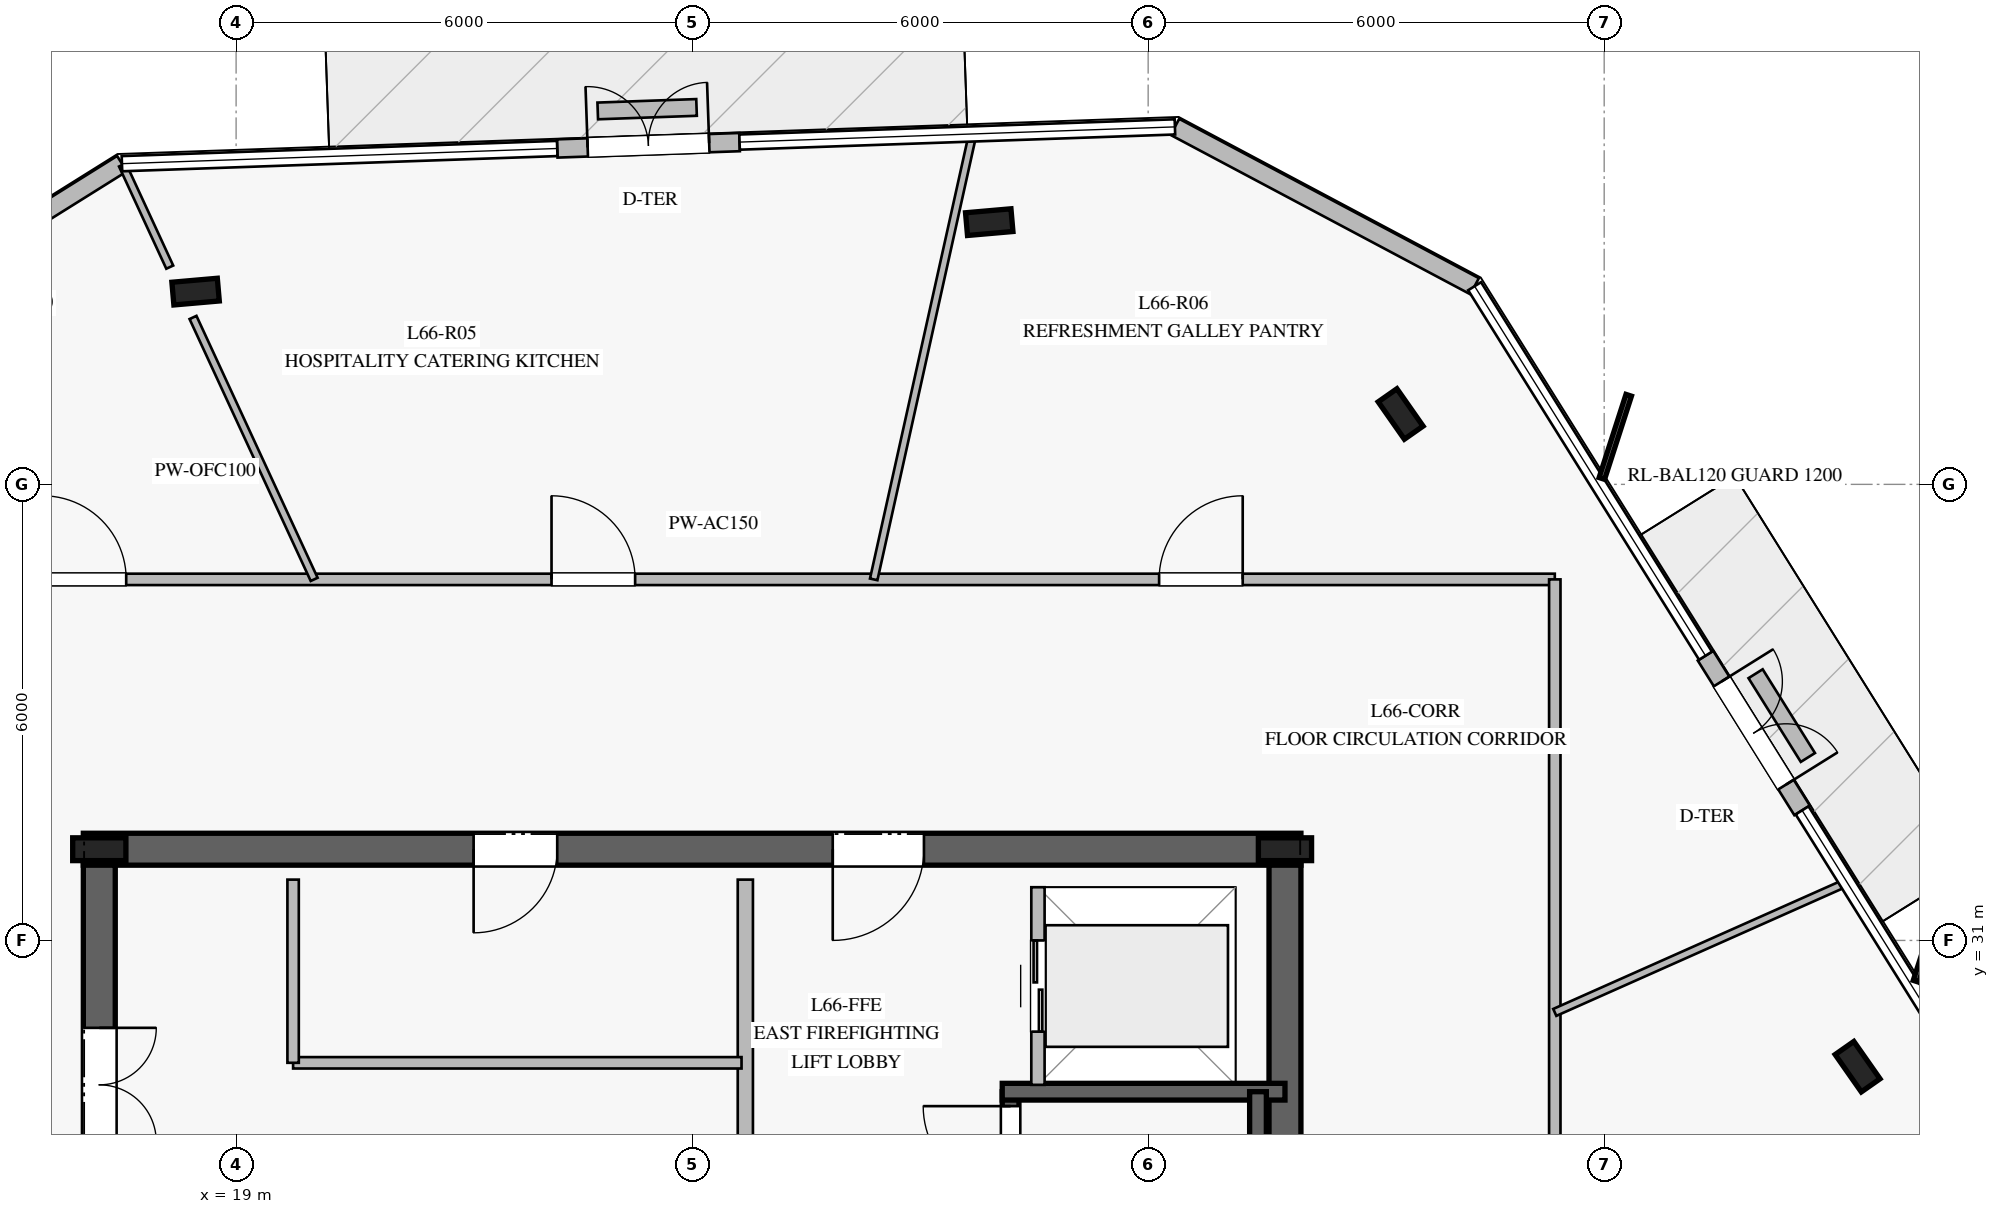
"""IFC4 building model, lengths in metres.
Left out: names, types, materials, properties, quantities, classifications, styles, units other than length and angle.
Written with IfcOpenShell. Run it as: python <this file> out.ifc"""

import sys

from ifc_helpers import new_model, si_unit, direction, frame, frame_2d, origin, origin_2d, place, context, subcontext, project, spatial, rectangle, i_section, extrude, element, fill, save


model = new_model("IFC4")
c1 = context("Model", 3, precision=1e-05, world=origin(), true_north=direction((0.0, 1.0)))
c2 = subcontext(c1, "Body", "Model", "MODEL_VIEW")
j1 = project(units=[si_unit("LENGTHUNIT", "METRE"), si_unit("PLANEANGLEUNIT", "RADIAN")], contexts=[c1])
p1 = place(None, origin())
s1 = spatial("IfcSite", under=j1, at=p1, CompositionType="ELEMENT")
p2 = place(p1, origin())
s2 = spatial("IfcBuilding", under=s1, at=p2, CompositionType="ELEMENT")
p3 = place(p2, frame((0.0, 0.0, 274.2)))
s3 = spatial("IfcBuildingStorey", under=s2, at=p3, CompositionType="ELEMENT", Elevation=274.2)
p4 = place(p3, frame((33.01, 32.2, 0.0), z_axis=(0.0, 0.0, 1.0), x_axis=(-1.0, 0.0, 0.0)))
e1 = element("IfcWall", 1, at=p4, inside=s3, PredefinedType="SHEAR", context=c2, shape_type="SweptSolid", body=[
    extrude(rectangle(XDim=16.02, YDim=0.42, at=frame_2d((8.01, 0.0))), origin(), (0.0, 0.0, 1.0), 3.78),
])
p5 = place(p4, frame((4.96, 0.0, 0.0)))
e2 = element("IfcOpeningElement", 2, at=p5, cuts=e1, PredefinedType="OPENING", context=c2, shape_type="SweptSolid", body=[
    extrude(rectangle(XDim=1.2, YDim=2.25, at=frame_2d((0.6, 1.125))), frame((0.0, 0.22, 0.0), z_axis=(0.0, -1.0, 0.0), x_axis=(1.0, 0.0, 0.0)), (0.0, 0.0, 1.0), 0.44),
])
p6 = place(p4, frame((9.785, 0.0, 0.0)))
e3 = element("IfcOpeningElement", 3, at=p6, cuts=e1, PredefinedType="OPENING", context=c2, shape_type="SweptSolid", body=[
    extrude(rectangle(XDim=1.1, YDim=2.2, at=frame_2d((0.55, 1.1))), frame((0.0, 0.22, 0.0), z_axis=(0.0, -1.0, 0.0), x_axis=(1.0, 0.0, 0.0)), (0.0, 0.0, 1.0), 0.44),
])
p7 = place(p3, frame((17.2, 31.99, 0.0), z_axis=(0.0, 0.0, 1.0), x_axis=(0.0, -1.0, 0.0)))
e4 = element("IfcWall", 4, at=p7, inside=s3, PredefinedType="SHEAR", context=c2, shape_type="SweptSolid", body=[
    extrude(rectangle(XDim=13.98, YDim=0.42, at=frame_2d((6.99, 0.0))), origin(), (0.0, 0.0, 1.0), 3.78),
])
p8 = place(p7, frame((2.14, 0.0, 0.0)))
e5 = element("IfcOpeningElement", 5, at=p8, cuts=e4, PredefinedType="OPENING", context=c2, shape_type="SweptSolid", body=[
    extrude(rectangle(XDim=1.5, YDim=2.2, at=frame_2d((0.75, 1.1))), frame((0.0, 0.22, 0.0), z_axis=(0.0, -1.0, 0.0), x_axis=(1.0, 0.0, 0.0)), (0.0, 0.0, 1.0), 0.44),
])
p9 = place(p3, frame((32.8, 18.01, 0.0), z_axis=(0.0, 0.0, 1.0), x_axis=(0.0, 1.0, 0.0)))
e6 = element("IfcWall", 6, at=p9, inside=s3, PredefinedType="SHEAR", context=c2, shape_type="SweptSolid", body=[
    extrude(rectangle(XDim=13.98, YDim=0.42, at=frame_2d((6.99, 0.0))), origin(), (0.0, 0.0, 1.0), 3.78),
])
for number, where, z_axis, x_axis in (
    (7, (32.8, 32.2, 0.0), (0.0, 0.0, 1.0), (1.0, 0.0, 0.0)),
    (8, (17.2, 32.2, 0.0), (0.0, 0.0, 1.0), (1.0, 0.0, 0.0)),
):
    element("IfcColumn", number, at=place(p3, frame(where, z_axis=z_axis, x_axis=x_axis)), inside=s3, PredefinedType="COLUMN", context=c2, shape_type="SweptSolid", body=[
        extrude(i_section(OverallWidth=0.3, OverallDepth=0.7, WebThickness=0.017, FlangeThickness=0.032, at=origin_2d()), origin(), (0.0, 0.0, 1.0), 4.0),
    ])
p10 = place(p3, frame((29.19, 21.79, 0.0), z_axis=(0.0, 0.0, 1.0), x_axis=(0.0, 1.0, 0.0)))
e9 = element("IfcWall", 9, at=p10, inside=s3, PredefinedType="SOLIDWALL", context=c2, shape_type="SweptSolid", body=[
    extrude(rectangle(XDim=7.22, YDim=0.22, at=frame_2d((3.61, 0.0))), origin(), (0.0, 0.0, 1.0), 3.78),
])
p11 = place(p10, frame((5.88, 0.0, 0.0)))
e10 = element("IfcOpeningElement", 10, at=p11, cuts=e9, PredefinedType="OPENING", context=c2, shape_type="SweptSolid", body=[
    extrude(rectangle(XDim=1.15, YDim=2.2, at=frame_2d((0.575, 1.1))), frame((0.0, 0.12, 0.0), z_axis=(0.0, -1.0, 0.0), x_axis=(1.0, 0.0, 0.0)), (0.0, 0.0, 1.0), 0.24),
])
p12 = place(p3, frame((29.08, 29.01, 0.0), z_axis=(0.0, 0.0, 1.0), x_axis=(1.0, 0.0, 0.0)))
e11 = element("IfcWall", 11, at=p12, inside=s3, PredefinedType="SOLIDWALL", context=c2, shape_type="SweptSolid", body=[
    extrude(rectangle(XDim=3.72, YDim=0.22, at=frame_2d((1.86, 0.0))), origin(), (0.0, 0.0, 1.0), 3.78),
])
p13 = place(p3, frame((32.445, 29.01, 0.0), z_axis=(0.0, 0.0, 1.0), x_axis=(0.0, -1.0, 0.0)))
e12 = element("IfcWall", 12, at=p13, inside=s3, PredefinedType="SOLIDWALL", context=c2, shape_type="SweptSolid", body=[
    extrude(rectangle(XDim=7.22, YDim=0.22, at=frame_2d((3.61, 0.0))), origin(), (0.0, 0.0, 1.0), 3.78),
])
for number, where, z_axis, x_axis in (
    (13, (28.909, 40.45, 0.0), (0.0, 0.0, 1.0), (0.996, 0.087, 0.0)),
    (14, (18.467, 39.536, 0.0), (0.0, 0.0, 1.0), (0.996, 0.087, 0.0)),
    (15, (40.334, 29.339, 0.0), (0.0, 0.0, 1.0), (-0.574, 0.819, 0.0)),
    (16, (34.322, 37.926, 0.0), (0.0, 0.0, 1.0), (-0.574, 0.819, 0.0)),
):
    element("IfcColumn", number, at=place(p3, frame(where, z_axis=z_axis, x_axis=x_axis)), inside=s3, PredefinedType="COLUMN", context=c2, shape_type="SweptSolid", body=[
        extrude(i_section(OverallWidth=0.3, OverallDepth=0.6, WebThickness=0.015, FlangeThickness=0.03, at=origin_2d()), origin(), (0.0, 0.0, 1.0), 4.0),
    ])
p14 = place(p3, frame((25.624, 41.503, 0.0), z_axis=(0.0, 0.0, 1.0), x_axis=(-0.999387742129, -0.03498772474, 0.0)))
e17 = element("IfcWall", 17, at=p14, inside=s3, PredefinedType="STANDARD", context=c2, shape_type="SweptSolid", body=[
    extrude(rectangle(XDim=2.4, YDim=0.24, at=frame_2d((1.2, 0.0))), origin(), (0.0, 0.0, 1.0), 3.78),
])
p15 = place(p14, frame((0.4, 0.0, 0.0)))
e18 = element("IfcOpeningElement", 18, at=p15, cuts=e17, PredefinedType="OPENING", context=c2, shape_type="SweptSolid", body=[
    extrude(rectangle(XDim=1.6, YDim=2.25, at=frame_2d((0.8, 1.125))), frame((0.0, 0.13, 0.0), z_axis=(0.0, -1.0, 0.0), x_axis=(1.0, 0.0, 0.0)), (0.0, 0.0, 1.0), 0.26),
])
p16 = place(p3, frame((17.498, 41.219, 0.0), z_axis=(0.0, 0.0, 1.0), x_axis=(-0.847998304005, -0.529998940003, 0.0)))
e19 = element("IfcWall", 19, at=p16, inside=s3, PredefinedType="STANDARD", context=c2, shape_type="SweptSolid", body=[
    extrude(rectangle(XDim=4.466, YDim=0.24, at=frame_2d((2.233, 0.0))), origin(), (0.0, 0.0, 1.0), 3.78),
])
p17 = place(p3, frame((39.604, 32.711, 0.0), z_axis=(0.0, 0.0, 1.0), x_axis=(-0.529706236636, 0.848181173376, 0.0)))
e20 = element("IfcWall", 20, at=p17, inside=s3, PredefinedType="STANDARD", context=c2, shape_type="SweptSolid", body=[
    extrude(rectangle(XDim=2.399, YDim=0.24, at=frame_2d((1.2, 0.0))), origin(), (0.0, 0.0, 1.0), 3.78),
])
p18 = place(p17, frame((0.4, 0.0, 0.0)))
e21 = element("IfcOpeningElement", 21, at=p18, cuts=e20, PredefinedType="OPENING", context=c2, shape_type="SweptSolid", body=[
    extrude(rectangle(XDim=1.6, YDim=2.25, at=frame_2d((0.8, 1.125))), frame((0.0, 0.13, 0.0), z_axis=(0.0, -1.0, 0.0), x_axis=(1.0, 0.0, 0.0)), (0.0, 0.0, 1.0), 0.26),
])
p19 = place(p3, frame((35.295, 39.607, 0.0), z_axis=(0.0, 0.0, 1.0), x_axis=(-0.882995347911, 0.469381737574, 0.0)))
e22 = element("IfcWall", 22, at=p19, inside=s3, PredefinedType="STANDARD", context=c2, shape_type="SweptSolid", body=[
    extrude(rectangle(XDim=4.465, YDim=0.24, at=frame_2d((2.233, 0.0))), origin(), (0.0, 0.0, 1.0), 3.78),
])
p20 = place(p3, frame((39.68, 33.407, 0.0), z_axis=(0.0, 0.0, 1.0), x_axis=(-0.52955968417, 0.848272680747, 0.0)))
e23 = element("IfcWall", 23, at=p20, inside=s3, PredefinedType="USERDEFINED", context=c2, shape_type="SweptSolid", body=[
    extrude(rectangle(XDim=1.299, YDim=0.22, at=frame_2d((0.649, 0.0))), origin(), (0.0, 0.0, 1.0), 0.4),
])
p21 = place(p3, frame((25.058, 41.959, 0.0), z_axis=(0.0, 0.0, 1.0), x_axis=(-0.9993773547, -0.035283181725, 0.0)))
e24 = element("IfcWall", 24, at=p21, inside=s3, PredefinedType="USERDEFINED", context=c2, shape_type="SweptSolid", body=[
    extrude(rectangle(XDim=1.301, YDim=0.22, at=frame_2d((0.65, 0.0))), origin(), (0.0, 0.0, 1.0), 0.4),
])
p22 = place(p3, frame((25.7, 26.65, 0.0), z_axis=(0.0, 0.0, 1.0), x_axis=(0.0, 1.0, 0.0)))
e25 = element("IfcWall", 25, at=p22, inside=s3, PredefinedType="PARTITIONING", context=c2, shape_type="SweptSolid", body=[
    extrude(rectangle(XDim=5.15, YDim=0.2, at=frame_2d((2.575, 0.0))), origin(), (0.0, 0.0, 1.0), 3.78),
])
p23 = place(p3, frame((19.75, 29.39, 0.0), z_axis=(0.0, 0.0, 1.0), x_axis=(1.0, 0.0, 0.0)))
e26 = element("IfcWall", 26, at=p23, inside=s3, PredefinedType="PARTITIONING", context=c2, shape_type="SweptSolid", body=[
    extrude(rectangle(XDim=5.9, YDim=0.15, at=frame_2d((2.95, 0.0))), origin(), (0.0, 0.0, 1.0), 3.78),
])
p24 = place(p3, frame((19.75, 29.39, 0.0), z_axis=(0.0, 0.0, 1.0), x_axis=(0.0, 1.0, 0.0)))
e27 = element("IfcWall", 27, at=p24, inside=s3, PredefinedType="PARTITIONING", context=c2, shape_type="SweptSolid", body=[
    extrude(rectangle(XDim=2.41, YDim=0.15, at=frame_2d((1.205, 0.0))), origin(), (0.0, 0.0, 1.0), 3.78),
])
p25 = place(p3, frame((29.55, 29.1, 0.0), z_axis=(0.0, 0.0, 1.0), x_axis=(0.0, 1.0, 0.0)))
e28 = element("IfcWall", 28, at=p25, inside=s3, PredefinedType="PARTITIONING", context=c2, shape_type="SweptSolid", body=[
    extrude(rectangle(XDim=2.6, YDim=0.175, at=frame_2d((1.3, 0.0))), origin(), (0.0, 0.0, 1.0), 3.78),
])
p26 = place(p25, frame((0.7, 0.0, 0.0)))
e29 = element("IfcOpeningElement", 29, at=p26, cuts=e28, PredefinedType="OPENING", context=c2, shape_type="SweptSolid", body=[
    extrude(rectangle(XDim=1.2, YDim=2.2, at=frame_2d((0.6, 1.1))), frame((0.0, 0.098, 0.0), z_axis=(0.0, -1.0, 0.0), x_axis=(1.0, 0.0, 0.0)), (0.0, 0.0, 1.0), 0.195),
])
p27 = place(p3, frame((13.65, 35.75, 0.0), z_axis=(0.0, 0.0, 1.0), x_axis=(1.0, 0.0, 0.0)))
e30 = element("IfcWall", 30, at=p27, inside=s3, PredefinedType="PARTITIONING", context=c2, shape_type="SweptSolid", body=[
    extrude(rectangle(XDim=22.7, YDim=0.15, at=frame_2d((11.35, 0.0))), origin(), (0.0, 0.0, 1.0), 3.05),
])
p28 = place(p27, frame((9.5, 0.0, 0.0)))
e31 = element("IfcOpeningElement", 31, at=p28, cuts=e30, PredefinedType="OPENING", context=c2, shape_type="SweptSolid", body=[
    extrude(rectangle(XDim=1.1, YDim=2.2, at=frame_2d((0.55, 1.1))), frame((0.0, 0.085, 0.0), z_axis=(0.0, -1.0, 0.0), x_axis=(1.0, 0.0, 0.0)), (0.0, 0.0, 1.0), 0.17),
])
p29 = place(p27, frame((17.494, 0.0, 0.0)))
e32 = element("IfcOpeningElement", 32, at=p29, cuts=e30, PredefinedType="OPENING", context=c2, shape_type="SweptSolid", body=[
    extrude(rectangle(XDim=1.1, YDim=2.2, at=frame_2d((0.55, 1.1))), frame((0.0, 0.085, 0.0), z_axis=(0.0, -1.0, 0.0), x_axis=(1.0, 0.0, 0.0)), (0.0, 0.0, 1.0), 0.17),
])
p30 = place(p27, frame((2.804, 0.0, 0.0)))
e33 = element("IfcOpeningElement", 33, at=p30, cuts=e30, PredefinedType="OPENING", context=c2, shape_type="SweptSolid", body=[
    extrude(rectangle(XDim=1.1, YDim=2.2, at=frame_2d((0.55, 1.1))), frame((0.0, 0.085, 0.0), z_axis=(0.0, -1.0, 0.0), x_axis=(1.0, 0.0, 0.0)), (0.0, 0.0, 1.0), 0.17),
])
p31 = place(p3, frame((36.35, 35.75, 0.0), z_axis=(0.0, 0.0, 1.0), x_axis=(0.0, -1.0, 0.0)))
e34 = element("IfcWall", 34, at=p31, inside=s3, PredefinedType="PARTITIONING", context=c2, shape_type="SweptSolid", body=[
    extrude(rectangle(XDim=21.5, YDim=0.15, at=frame_2d((10.75, 0.0))), origin(), (0.0, 0.0, 1.0), 3.28),
])
p32 = place(p31, frame((18.344, 0.0, 0.0)))
e35 = element("IfcOpeningElement", 35, at=p32, cuts=e34, PredefinedType="OPENING", context=c2, shape_type="SweptSolid", body=[
    extrude(rectangle(XDim=1.1, YDim=2.2, at=frame_2d((0.55, 1.1))), frame((0.0, 0.085, 0.0), z_axis=(0.0, -1.0, 0.0), x_axis=(1.0, 0.0, 0.0)), (0.0, 0.0, 1.0), 0.17),
])
p33 = place(p31, frame((10.606, 0.0, 0.0)))
e36 = element("IfcOpeningElement", 36, at=p33, cuts=e34, PredefinedType="OPENING", context=c2, shape_type="SweptSolid", body=[
    extrude(rectangle(XDim=1.1, YDim=2.2, at=frame_2d((0.55, 1.1))), frame((0.0, 0.085, 0.0), z_axis=(0.0, -1.0, 0.0), x_axis=(1.0, 0.0, 0.0)), (0.0, 0.0, 1.0), 0.17),
])
p34 = place(p3, frame((20.027, 35.75, 0.0), z_axis=(0.0, 0.0, 1.0), x_axis=(-0.419820544202, 0.907607134539, 0.0)))
e37 = element("IfcWall", 37, at=p34, inside=s3, PredefinedType="MOVABLE", context=c2, shape_type="SweptSolid", body=[
    extrude(rectangle(XDim=3.797, YDim=0.1, at=frame_2d((1.898, 0.0))), origin(), (0.0, 0.0, 1.0), 3.28),
])
p35 = place(p3, frame((18.127, 39.858, 0.0), z_axis=(0.0, 0.0, 1.0), x_axis=(-0.419789381907, 0.907621548245, 0.0)))
e38 = element("IfcWall", 38, at=p35, inside=s3, PredefinedType="MOVABLE", context=c2, shape_type="SweptSolid", body=[
    extrude(rectangle(XDim=1.482, YDim=0.1, at=frame_2d((0.741, 0.0))), origin(), (0.0, 0.0, 1.0), 3.78),
])
p36 = place(p3, frame((36.35, 30.053, 0.0), z_axis=(0.0, 0.0, 1.0), x_axis=(0.91359052296, 0.40663540962, 0.0)))
e39 = element("IfcWall", 39, at=p36, inside=s3, PredefinedType="MOVABLE", context=c2, shape_type="SweptSolid", body=[
    extrude(rectangle(XDim=4.193, YDim=0.1, at=frame_2d((2.097, 0.0))), origin(), (0.0, 0.0, 1.0), 3.28),
])
p37 = place(p3, frame((27.389, 35.75, 0.0), z_axis=(0.0, 0.0, 1.0), x_axis=(0.216995227023, 0.976172664773, 0.0)))
e40 = element("IfcWall", 40, at=p37, inside=s3, PredefinedType="MOVABLE", context=c2, shape_type="SweptSolid", body=[
    extrude(rectangle(XDim=5.987, YDim=0.1, at=frame_2d((2.993, 0.0))), origin(), (0.0, 0.0, 1.0), 3.05),
])
p38 = place(p15, frame((1.6, 0.0, 0.0), z_axis=(0.0, 0.0, 1.0), x_axis=(-1.0, 0.0, 0.0)))
e41 = element("IfcDoor", 41, at=p38, inside=s3, OperationType="DOUBLE_DOOR_SINGLE_SWING", PredefinedType="DOOR", context=c2, shape_type="SweptSolid", body=[
    extrude(rectangle(XDim=1.6, YDim=2.25, at=frame_2d((0.8, 1.125))), frame((0.0, 0.025, 0.0), z_axis=(0.0, -1.0, 0.0), x_axis=(1.0, 0.0, 0.0)), (0.0, 0.0, 1.0), 0.05),
])
fill(e18, e41)
p39 = place(p18, frame((1.6, 0.0, 0.0), z_axis=(0.0, 0.0, 1.0), x_axis=(-1.0, 0.0, 0.0)))
e42 = element("IfcDoor", 42, at=p39, inside=s3, OperationType="DOUBLE_DOOR_SINGLE_SWING", PredefinedType="DOOR", context=c2, shape_type="SweptSolid", body=[
    extrude(rectangle(XDim=1.6, YDim=2.25, at=frame_2d((0.8, 1.125))), frame((0.0, 0.025, 0.0), z_axis=(0.0, -1.0, 0.0), x_axis=(1.0, 0.0, 0.0)), (0.0, 0.0, 1.0), 0.05),
])
fill(e21, e42)
p40 = place(p11, origin())
e43 = element("IfcDoor", 43, at=p40, inside=s3, OperationType="SINGLE_SWING_RIGHT", PredefinedType="DOOR", context=c2, shape_type="SweptSolid", body=[
    extrude(rectangle(XDim=1.15, YDim=2.2, at=frame_2d((0.575, 1.1))), frame((0.0, 0.025, 0.0), z_axis=(0.0, -1.0, 0.0), x_axis=(1.0, 0.0, 0.0)), (0.0, 0.0, 1.0), 0.05),
])
fill(e10, e43)
p41 = place(p5, origin())
e44 = element("IfcDoor", 44, at=p41, inside=s3, OperationType="SINGLE_SWING_RIGHT", PredefinedType="DOOR", context=c2, shape_type="SweptSolid", body=[
    extrude(rectangle(XDim=1.2, YDim=2.25, at=frame_2d((0.6, 1.125))), frame((0.0, 0.025, 0.0), z_axis=(0.0, -1.0, 0.0), x_axis=(1.0, 0.0, 0.0)), (0.0, 0.0, 1.0), 0.05),
])
fill(e2, e44)
p42 = place(p8, origin())
e45 = element("IfcDoor", 45, at=p42, inside=s3, OperationType="DOUBLE_DOOR_SINGLE_SWING", PredefinedType="DOOR", context=c2, shape_type="SweptSolid", body=[
    extrude(rectangle(XDim=1.5, YDim=2.2, at=frame_2d((0.75, 1.1))), frame((0.0, 0.025, 0.0), z_axis=(0.0, -1.0, 0.0), x_axis=(1.0, 0.0, 0.0)), (0.0, 0.0, 1.0), 0.05),
])
fill(e5, e45)
p43 = place(p6, origin())
e46 = element("IfcDoor", 46, at=p43, inside=s3, OperationType="SINGLE_SWING_RIGHT", PredefinedType="DOOR", context=c2, shape_type="SweptSolid", body=[
    extrude(rectangle(XDim=1.1, YDim=2.2, at=frame_2d((0.55, 1.1))), frame((0.0, 0.025, 0.0), z_axis=(0.0, -1.0, 0.0), x_axis=(1.0, 0.0, 0.0)), (0.0, 0.0, 1.0), 0.05),
])
fill(e3, e46)
p44 = place(p26, origin())
e47 = element("IfcDoor", 47, at=p44, inside=s3, OperationType="DOUBLE_DOOR_SLIDING", PredefinedType="DOOR", context=c2, shape_type="SweptSolid", body=[
    extrude(rectangle(XDim=1.2, YDim=2.2, at=frame_2d((0.6, 1.1))), frame((0.0, 0.025, 0.0), z_axis=(0.0, -1.0, 0.0), x_axis=(1.0, 0.0, 0.0)), (0.0, 0.0, 1.0), 0.05),
])
fill(e29, e47)
p45 = place(p28, origin())
e48 = element("IfcDoor", 48, at=p45, inside=s3, OperationType="SINGLE_SWING_LEFT", PredefinedType="DOOR", context=c2, shape_type="SweptSolid", body=[
    extrude(rectangle(XDim=1.1, YDim=2.2, at=frame_2d((0.55, 1.1))), frame((0.0, 0.025, 0.0), z_axis=(0.0, -1.0, 0.0), x_axis=(1.0, 0.0, 0.0)), (0.0, 0.0, 1.0), 0.05),
])
fill(e31, e48)
p46 = place(p29, origin())
e49 = element("IfcDoor", 49, at=p46, inside=s3, OperationType="SINGLE_SWING_RIGHT", PredefinedType="DOOR", context=c2, shape_type="SweptSolid", body=[
    extrude(rectangle(XDim=1.1, YDim=2.2, at=frame_2d((0.55, 1.1))), frame((0.0, 0.025, 0.0), z_axis=(0.0, -1.0, 0.0), x_axis=(1.0, 0.0, 0.0)), (0.0, 0.0, 1.0), 0.05),
])
fill(e32, e49)
p47 = place(p30, origin())
e50 = element("IfcDoor", 50, at=p47, inside=s3, OperationType="SINGLE_SWING_LEFT", PredefinedType="DOOR", context=c2, shape_type="SweptSolid", body=[
    extrude(rectangle(XDim=1.1, YDim=2.2, at=frame_2d((0.55, 1.1))), frame((0.0, 0.025, 0.0), z_axis=(0.0, -1.0, 0.0), x_axis=(1.0, 0.0, 0.0)), (0.0, 0.0, 1.0), 0.05),
])
fill(e33, e50)
save(model, sys.argv[1])
